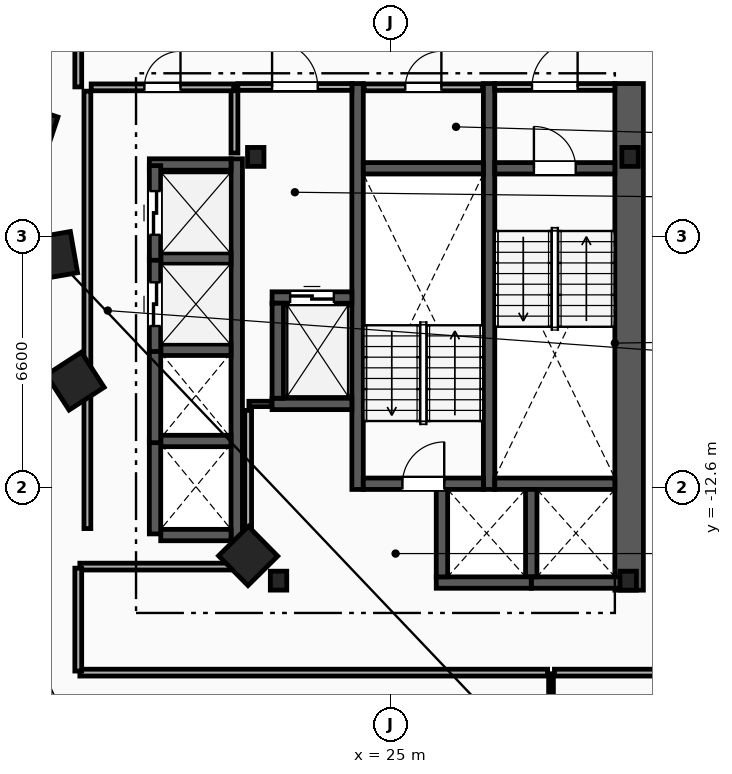
"""IFC4 building model, lengths in metres.
Left out: names, types, materials, properties, quantities, classifications, styles, units other than length and angle.
Written with IfcOpenShell. Run it as: python <this file> out.ifc"""

import sys

from ifc_helpers import new_model, si_unit, direction, frame, frame_2d, origin, origin_2d, place, context, subcontext, project, spatial, rectangle, i_section, extrude, element, fill, save


model = new_model("IFC4")
c1 = context("Model", 3, precision=1e-05, world=origin(), true_north=direction((0.0, 1.0)))
c2 = subcontext(c1, "Body", "Model", "MODEL_VIEW")
j1 = project(units=[si_unit("LENGTHUNIT", "METRE"), si_unit("PLANEANGLEUNIT", "RADIAN")], contexts=[c1])
p1 = place(None, origin())
s1 = spatial("IfcSite", under=j1, at=p1, CompositionType="ELEMENT")
p2 = place(p1, origin())
s2 = spatial("IfcBuilding", under=s1, at=p2, CompositionType="ELEMENT")
p3 = place(p2, frame((0.0, 0.0, 81.8)))
s3 = spatial("IfcBuildingStorey", under=s2, at=p3, CompositionType="ELEMENT", Elevation=81.8)
for number, where, z_axis, x_axis in (
    (1, (31.3, -3.9, 0.0), (0.0, 0.0, 1.0), (1.0, 0.0, 0.0)),
    (2, (21.45, -3.9, 0.0), (0.0, 0.0, 1.0), (1.0, 0.0, 0.0)),
    (3, (22.05, -15.05, 0.0), (0.0, 0.0, 1.0), (1.0, 0.0, 0.0)),
    (4, (31.25, -15.05, 0.0), (0.0, 0.0, 1.0), (1.0, 0.0, 0.0)),
):
    element("IfcColumn", number, at=place(p3, frame(where, z_axis=z_axis, x_axis=x_axis)), inside=s3, PredefinedType="COLUMN", context=c2, shape_type="SweptSolid", body=[
        extrude(i_section(OverallWidth=0.432, OverallDepth=0.498, WebThickness=0.056, FlangeThickness=0.089, FilletRadius=0.018, at=origin_2d()), origin(), (0.0, 0.0, 1.0), 3.6),
    ])
for number, where, z_axis, x_axis in (
    (5, (15.55, -3.2, 0.0), (0.0, 0.0, 1.0), (-0.315, -0.949, 0.0)),
    (6, (16.125, -6.5, 0.0), (0.0, 0.0, 1.0), (0.172, -0.985, 0.0)),
    (7, (16.7, -9.8, 0.0), (0.0, 0.0, 1.0), (0.544, -0.839, 0.0)),
    (8, (21.25, -14.4, 0.0), (0.0, 0.0, 1.0), (0.703, -0.711, 0.0)),
):
    element("IfcColumn", number, at=place(p3, frame(where, z_axis=z_axis, x_axis=x_axis)), inside=s3, PredefinedType="COLUMN", context=c2, shape_type="SweptSolid", body=[
        extrude(rectangle(XDim=1.1, YDim=1.1, at=origin_2d()), origin(), (0.0, 0.0, 1.0), 3.6),
    ])
p4 = place(p3, frame((31.275, -15.3, 0.0), z_axis=(0.0, 0.0, 1.0), x_axis=(0.0, 1.0, 0.0)))
e9 = element("IfcWall", 9, at=p4, inside=s3, PredefinedType="SHEAR", context=c2, shape_type="SweptSolid", body=[
    extrude(rectangle(XDim=13.33, YDim=0.75, at=frame_2d((6.665, 0.0))), origin(), (0.0, 0.0, 1.0), 3.3),
])
for number, where, z_axis, x_axis in (
    (10, (27.59, -12.65, 0.0), (0.0, 0.0, 1.0), (0.0, 1.0, 0.0)),
    (11, (24.13, -12.65, 0.0), (0.0, 0.0, 1.0), (0.0, 1.0, 0.0)),
):
    element("IfcWall", number, at=place(p3, frame(where, z_axis=z_axis, x_axis=x_axis)), inside=s3, PredefinedType="SHEAR", context=c2, shape_type="SweptSolid", body=[
        extrude(rectangle(XDim=10.68, YDim=0.3, at=frame_2d((5.34, 0.0))), origin(), (0.0, 0.0, 1.0), 3.3),
    ])
p5 = place(p3, frame((27.74, -4.2, 0.0), z_axis=(0.0, 0.0, 1.0), x_axis=(1.0, 0.0, 0.0)))
e12 = element("IfcWall", 12, at=p5, inside=s3, PredefinedType="SHEAR", context=c2, shape_type="SweptSolid", body=[
    extrude(rectangle(XDim=3.16, YDim=0.3, at=frame_2d((1.58, 0.0))), origin(), (0.0, 0.0, 1.0), 3.3),
])
p6 = place(p5, frame((1.03, 0.0, 0.0)))
e13 = element("IfcOpeningElement", 13, at=p6, cuts=e12, PredefinedType="OPENING", context=c2, shape_type="SweptSolid", body=[
    extrude(rectangle(XDim=1.1, YDim=2.15, at=frame_2d((0.55, 1.075))), frame((0.0, 0.16, 0.0), z_axis=(0.0, -1.0, 0.0), x_axis=(1.0, 0.0, 0.0)), (0.0, 0.0, 1.0), 0.32),
])
p7 = place(p3, frame((27.74, -12.5, 0.0), z_axis=(0.0, 0.0, 1.0), x_axis=(1.0, 0.0, 0.0)))
e14 = element("IfcWall", 14, at=p7, inside=s3, PredefinedType="SHEAR", context=c2, shape_type="SweptSolid", body=[
    extrude(rectangle(XDim=3.16, YDim=0.3, at=frame_2d((1.58, 0.0))), origin(), (0.0, 0.0, 1.0), 3.3),
])
p8 = place(p3, frame((24.28, -12.5, 0.0), z_axis=(0.0, 0.0, 1.0), x_axis=(1.0, 0.0, 0.0)))
e15 = element("IfcWall", 15, at=p8, inside=s3, PredefinedType="SHEAR", context=c2, shape_type="SweptSolid", body=[
    extrude(rectangle(XDim=3.16, YDim=0.3, at=frame_2d((1.58, 0.0))), origin(), (0.0, 0.0, 1.0), 3.3),
])
p9 = place(p8, frame((1.03, 0.0, 0.0)))
e16 = element("IfcOpeningElement", 16, at=p9, cuts=e15, PredefinedType="OPENING", context=c2, shape_type="SweptSolid", body=[
    extrude(rectangle(XDim=1.1, YDim=2.15, at=frame_2d((0.55, 1.075))), frame((0.0, 0.16, 0.0), z_axis=(0.0, -1.0, 0.0), x_axis=(1.0, 0.0, 0.0)), (0.0, 0.0, 1.0), 0.32),
])
p10 = place(p3, frame((24.28, -4.2, 0.0), z_axis=(0.0, 0.0, 1.0), x_axis=(1.0, 0.0, 0.0)))
e17 = element("IfcWall", 17, at=p10, inside=s3, PredefinedType="SHEAR", context=c2, shape_type="SweptSolid", body=[
    extrude(rectangle(XDim=3.16, YDim=0.3, at=frame_2d((1.58, 0.0))), origin(), (0.0, 0.0, 1.0), 3.3),
])
p11 = place(p3, frame((20.89, -3.8, 0.0), z_axis=(0.0, 0.0, 1.0), x_axis=(0.0, 1.0, 0.0)))
e18 = element("IfcWall", 18, at=p11, inside=s3, PredefinedType="PARTITIONING", context=c2, shape_type="SweptSolid", body=[
    extrude(rectangle(XDim=1.65, YDim=0.18, at=frame_2d((0.825, 0.0))), origin(), (0.0, 0.0, 1.0), 3.3),
])
p12 = place(p3, frame((20.98, -2.06, 0.0), z_axis=(0.0, 0.0, 1.0), x_axis=(1.0, 0.0, 0.0)))
e19 = element("IfcWall", 19, at=p12, inside=s3, PredefinedType="PARTITIONING", context=c2, shape_type="SweptSolid", body=[
    extrude(rectangle(XDim=3.0, YDim=0.18, at=frame_2d((1.5, 0.0))), origin(), (0.0, 0.0, 1.0), 3.3),
])
p13 = place(p12, frame((0.9, 0.0, 0.0)))
e20 = element("IfcOpeningElement", 20, at=p13, cuts=e19, PredefinedType="OPENING", context=c2, shape_type="SweptSolid", body=[
    extrude(rectangle(XDim=1.2, YDim=2.15, at=frame_2d((0.6, 1.075))), frame((0.0, 0.1, 0.0), z_axis=(0.0, -1.0, 0.0), x_axis=(1.0, 0.0, 0.0)), (0.0, 0.0, 1.0), 0.2),
])
p14 = place(p3, frame((27.74, -2.06, 0.0), z_axis=(0.0, 0.0, 1.0), x_axis=(1.0, 0.0, 0.0)))
e21 = element("IfcWall", 21, at=p14, inside=s3, PredefinedType="PARTITIONING", context=c2, shape_type="SweptSolid", body=[
    extrude(rectangle(XDim=3.16, YDim=0.18, at=frame_2d((1.58, 0.0))), origin(), (0.0, 0.0, 1.0), 3.3),
])
p15 = place(p14, frame((0.98, 0.0, 0.0)))
e22 = element("IfcOpeningElement", 22, at=p15, cuts=e21, PredefinedType="OPENING", context=c2, shape_type="SweptSolid", body=[
    extrude(rectangle(XDim=1.2, YDim=2.15, at=frame_2d((0.6, 1.075))), frame((0.0, 0.1, 0.0), z_axis=(0.0, -1.0, 0.0), x_axis=(1.0, 0.0, 0.0)), (0.0, 0.0, 1.0), 0.2),
])
p16 = place(p3, frame((21.88, -7.6, 0.0), z_axis=(0.0, 0.0, 1.0), x_axis=(1.0, 0.0, 0.0)))
e23 = element("IfcWall", 23, at=p16, inside=s3, PredefinedType="SHEAR", context=c2, shape_type="SweptSolid", body=[
    extrude(rectangle(XDim=2.1, YDim=0.3, at=frame_2d((1.05, 0.0))), origin(), (0.0, 0.0, 1.0), 3.3),
])
p17 = place(p16, frame((0.475, 0.0, 0.0)))
e24 = element("IfcOpeningElement", 24, at=p17, cuts=e23, PredefinedType="OPENING", context=c2, shape_type="SweptSolid", body=[
    extrude(rectangle(XDim=1.15, YDim=2.2, at=frame_2d((0.575, 1.1))), frame((0.0, 0.16, 0.0), z_axis=(0.0, -1.0, 0.0), x_axis=(1.0, 0.0, 0.0)), (0.0, 0.0, 1.0), 0.32),
])
p18 = place(p3, frame((21.88, -10.4, 0.0), z_axis=(0.0, 0.0, 1.0), x_axis=(1.0, 0.0, 0.0)))
e25 = element("IfcWall", 25, at=p18, inside=s3, PredefinedType="SHEAR", context=c2, shape_type="SweptSolid", body=[
    extrude(rectangle(XDim=2.1, YDim=0.3, at=frame_2d((1.05, 0.0))), origin(), (0.0, 0.0, 1.0), 3.3),
])
for number, where, z_axis, x_axis in (
    (26, (22.03, -10.25, 0.0), (0.0, 0.0, 1.0), (0.0, 1.0, 0.0)),
    (27, (28.7, -15.1, 0.0), (0.0, 0.0, 1.0), (1.0, 0.0, 0.0)),
):
    element("IfcWall", number, at=place(p3, frame(where, z_axis=z_axis, x_axis=x_axis)), inside=s3, PredefinedType="SHEAR", context=c2, shape_type="SweptSolid", body=[
        extrude(rectangle(XDim=2.5, YDim=0.3, at=frame_2d((1.25, 0.0))), origin(), (0.0, 0.0, 1.0), 3.3),
    ])
p19 = place(p3, frame((28.7, -14.95, 0.0), z_axis=(0.0, 0.0, 1.0), x_axis=(0.0, 1.0, 0.0)))
e28 = element("IfcWall", 28, at=p19, inside=s3, PredefinedType="SHEAR", context=c2, shape_type="SweptSolid", body=[
    extrude(rectangle(XDim=2.3, YDim=0.3, at=frame_2d((1.15, 0.0))), origin(), (0.0, 0.0, 1.0), 3.3),
])
p20 = place(p3, frame((26.2, -15.1, 0.0), z_axis=(0.0, 0.0, 1.0), x_axis=(1.0, 0.0, 0.0)))
e29 = element("IfcWall", 29, at=p20, inside=s3, PredefinedType="SHEAR", context=c2, shape_type="SweptSolid", body=[
    extrude(rectangle(XDim=2.5, YDim=0.3, at=frame_2d((1.25, 0.0))), origin(), (0.0, 0.0, 1.0), 3.3),
])
p21 = place(p3, frame((26.35, -14.95, 0.0), z_axis=(0.0, 0.0, 1.0), x_axis=(0.0, 1.0, 0.0)))
e30 = element("IfcWall", 30, at=p21, inside=s3, PredefinedType="SHEAR", context=c2, shape_type="SweptSolid", body=[
    extrude(rectangle(XDim=2.3, YDim=0.3, at=frame_2d((1.15, 0.0))), origin(), (0.0, 0.0, 1.0), 3.3),
])
p22 = place(p3, frame((20.95, -14.0, 0.0), z_axis=(0.0, 0.0, 1.0), x_axis=(0.0, 1.0, 0.0)))
e31 = element("IfcWall", 31, at=p22, inside=s3, PredefinedType="SHEAR", context=c2, shape_type="SweptSolid", body=[
    extrude(rectangle(XDim=10.05, YDim=0.3, at=frame_2d((5.025, 0.0))), origin(), (0.0, 0.0, 1.0), 3.3),
])
p23 = place(p3, frame((18.95, -13.85, 0.0), z_axis=(0.0, 0.0, 1.0), x_axis=(1.0, 0.0, 0.0)))
e32 = element("IfcWall", 32, at=p23, inside=s3, PredefinedType="SHEAR", context=c2, shape_type="SweptSolid", body=[
    extrude(rectangle(XDim=1.85, YDim=0.3, at=frame_2d((0.925, 0.0))), origin(), (0.0, 0.0, 1.0), 3.3),
])
p24 = place(p3, frame((18.65, -4.1, 0.0), z_axis=(0.0, 0.0, 1.0), x_axis=(1.0, 0.0, 0.0)))
e33 = element("IfcWall", 33, at=p24, inside=s3, PredefinedType="SHEAR", context=c2, shape_type="SweptSolid", body=[
    extrude(rectangle(XDim=2.15, YDim=0.3, at=frame_2d((1.075, 0.0))), origin(), (0.0, 0.0, 1.0), 3.3),
])
for number, where, z_axis, x_axis in (
    (34, (18.95, -11.375, 0.0), (0.0, 0.0, 1.0), (1.0, 0.0, 0.0)),
    (35, (18.95, -8.975, 0.0), (0.0, 0.0, 1.0), (1.0, 0.0, 0.0)),
    (36, (18.95, -6.575, 0.0), (0.0, 0.0, 1.0), (1.0, 0.0, 0.0)),
):
    element("IfcWall", number, at=place(p3, frame(where, z_axis=z_axis, x_axis=x_axis)), inside=s3, PredefinedType="SHEAR", context=c2, shape_type="SweptSolid", body=[
        extrude(rectangle(XDim=1.85, YDim=0.3, at=frame_2d((0.925, 0.0))), origin(), (0.0, 0.0, 1.0), 3.3),
    ])
for number, where, z_axis, x_axis in (
    (37, (18.8, -13.82, 0.0), (0.0, 0.0, 1.0), (0.0, 1.0, 0.0)),
    (38, (18.8, -11.42, 0.0), (0.0, 0.0, 1.0), (0.0, 1.0, 0.0)),
):
    element("IfcWall", number, at=place(p3, frame(where, z_axis=z_axis, x_axis=x_axis)), inside=s3, PredefinedType="SHEAR", context=c2, shape_type="SweptSolid", body=[
        extrude(rectangle(XDim=2.49, YDim=0.3, at=frame_2d((1.245, 0.0))), origin(), (0.0, 0.0, 1.0), 3.3),
    ])
p25 = place(p3, frame((18.8, -9.02, 0.0), z_axis=(0.0, 0.0, 1.0), x_axis=(0.0, 1.0, 0.0)))
e39 = element("IfcWall", 39, at=p25, inside=s3, PredefinedType="SHEAR", context=c2, shape_type="SweptSolid", body=[
    extrude(rectangle(XDim=2.49, YDim=0.3, at=frame_2d((1.245, 0.0))), origin(), (0.0, 0.0, 1.0), 3.3),
])
p26 = place(p25, frame((0.67, 0.0, 0.0)))
e40 = element("IfcOpeningElement", 40, at=p26, cuts=e39, PredefinedType="OPENING", context=c2, shape_type="SweptSolid", body=[
    extrude(rectangle(XDim=1.15, YDim=2.2, at=frame_2d((0.575, 1.1))), frame((0.0, 0.16, 0.0), z_axis=(0.0, -1.0, 0.0), x_axis=(1.0, 0.0, 0.0)), (0.0, 0.0, 1.0), 0.32),
])
p27 = place(p3, frame((18.8, -6.62, 0.0), z_axis=(0.0, 0.0, 1.0), x_axis=(0.0, 1.0, 0.0)))
e41 = element("IfcWall", 41, at=p27, inside=s3, PredefinedType="SHEAR", context=c2, shape_type="SweptSolid", body=[
    extrude(rectangle(XDim=2.49, YDim=0.3, at=frame_2d((1.245, 0.0))), origin(), (0.0, 0.0, 1.0), 3.3),
])
p28 = place(p27, frame((0.67, 0.0, 0.0)))
e42 = element("IfcOpeningElement", 42, at=p28, cuts=e41, PredefinedType="OPENING", context=c2, shape_type="SweptSolid", body=[
    extrude(rectangle(XDim=1.15, YDim=2.2, at=frame_2d((0.575, 1.1))), frame((0.0, 0.16, 0.0), z_axis=(0.0, -1.0, 0.0), x_axis=(1.0, 0.0, 0.0)), (0.0, 0.0, 1.0), 0.32),
])
p29 = place(p3, frame((17.02, -13.68, 0.0), z_axis=(0.0, 0.0, 1.0), x_axis=(0.0, 1.0, 0.0)))
e43 = element("IfcWall", 43, at=p29, inside=s3, PredefinedType="PARTITIONING", context=c2, shape_type="SweptSolid", body=[
    extrude(rectangle(XDim=11.51, YDim=0.18, at=frame_2d((5.755, 0.0))), origin(), (0.0, 0.0, 1.0), 3.3),
])
p30 = place(p3, frame((17.12, -2.07, 0.0), z_axis=(0.0, 0.0, 1.0), x_axis=(1.0, 0.0, 0.0)))
e44 = element("IfcWall", 44, at=p30, inside=s3, PredefinedType="PARTITIONING", context=c2, shape_type="SweptSolid", body=[
    extrude(rectangle(XDim=3.75, YDim=0.18, at=frame_2d((1.875, 0.0))), origin(), (0.0, 0.0, 1.0), 3.3),
])
p31 = place(p30, frame((1.4, 0.0, 0.0)))
e45 = element("IfcOpeningElement", 45, at=p31, cuts=e44, PredefinedType="OPENING", context=c2, shape_type="SweptSolid", body=[
    extrude(rectangle(XDim=0.95, YDim=2.1, at=frame_2d((0.475, 1.05))), frame((0.0, 0.1, 0.0), z_axis=(0.0, -1.0, 0.0), x_axis=(1.0, 0.0, 0.0)), (0.0, 0.0, 1.0), 0.2),
])
p32 = place(p3, frame((21.27, -10.4, 0.0), z_axis=(0.0, 0.0, 1.0), x_axis=(1.0, 0.0, 0.0)))
e46 = element("IfcWall", 46, at=p32, inside=s3, PredefinedType="PARTITIONING", context=c2, shape_type="SweptSolid", body=[
    extrude(rectangle(XDim=0.59, YDim=0.14, at=frame_2d((0.295, 0.0))), origin(), (0.0, 0.0, 1.0), 3.3),
])
p33 = place(p3, frame((21.25, -14.93, 0.0), z_axis=(0.0, 0.0, 1.0), x_axis=(0.0, 1.0, 0.0)))
e47 = element("IfcWall", 47, at=p33, inside=s3, PredefinedType="PARTITIONING", context=c2, shape_type="SweptSolid", body=[
    extrude(rectangle(XDim=4.36, YDim=0.18, at=frame_2d((2.18, 0.0))), origin(), (0.0, 0.0, 1.0), 3.3),
])
p34 = place(p3, frame((24.3, -2.07, 0.0), z_axis=(0.0, 0.0, 1.0), x_axis=(1.0, 0.0, 0.0)))
e48 = element("IfcWall", 48, at=p34, inside=s3, PredefinedType="PARTITIONING", context=c2, shape_type="SweptSolid", body=[
    extrude(rectangle(XDim=3.12, YDim=0.18, at=frame_2d((1.56, 0.0))), origin(), (0.0, 0.0, 1.0), 3.3),
])
p35 = place(p34, frame((1.085, 0.0, 0.0)))
e49 = element("IfcOpeningElement", 49, at=p35, cuts=e48, PredefinedType="OPENING", context=c2, shape_type="SweptSolid", body=[
    extrude(rectangle(XDim=0.95, YDim=2.1, at=frame_2d((0.475, 1.05))), frame((0.0, 0.1, 0.0), z_axis=(0.0, -1.0, 0.0), x_axis=(1.0, 0.0, 0.0)), (0.0, 0.0, 1.0), 0.2),
])
p36 = place(p3, frame((29.22, -25.966, 0.0), z_axis=(0.0, 0.0, 1.0), x_axis=(0.0, 1.0, 0.0)))
e50 = element("IfcWall", 50, at=p36, inside=s3, PredefinedType="PARTITIONING", context=c2, shape_type="SweptSolid", body=[
    extrude(rectangle(XDim=8.466, YDim=0.125, at=frame_2d((4.233, 0.0))), origin(), (0.0, 0.0, 1.0), 3.3),
])
p37 = place(p3, frame((29.31, -17.47, 0.0), z_axis=(0.0, 0.0, 1.0), x_axis=(1.0, 0.0, 0.0)))
e51 = element("IfcWall", 51, at=p37, inside=s3, PredefinedType="PARTITIONING", context=c2, shape_type="SweptSolid", body=[
    extrude(rectangle(XDim=4.318, YDim=0.18, at=frame_2d((2.159, 0.0))), origin(), (0.0, 0.0, 1.0), 3.3),
])
p38 = place(p3, frame((16.822, -17.47, 0.0), z_axis=(0.0, 0.0, 1.0), x_axis=(1.0, 0.0, 0.0)))
e52 = element("IfcWall", 52, at=p38, inside=s3, PredefinedType="PARTITIONING", context=c2, shape_type="SweptSolid", body=[
    extrude(rectangle(XDim=12.308, YDim=0.18, at=frame_2d((6.154, 0.0))), origin(), (0.0, 0.0, 1.0), 3.3),
])
p39 = place(p3, frame((21.178, -14.68, 0.0), z_axis=(0.0, 0.0, 1.0), x_axis=(-1.0, 0.0, 0.0)))
e53 = element("IfcWall", 53, at=p39, inside=s3, PredefinedType="PARTITIONING", context=c2, shape_type="SweptSolid", body=[
    extrude(rectangle(XDim=4.357, YDim=0.18, at=frame_2d((2.178, 0.0))), origin(), (0.0, 0.0, 1.0), 3.3),
])
p40 = place(p3, frame((16.78, -14.721, 0.0), z_axis=(0.0, 0.0, 1.0), x_axis=(0.0, -1.0, 0.0)))
e54 = element("IfcWall", 54, at=p40, inside=s3, PredefinedType="PARTITIONING", context=c2, shape_type="SweptSolid", body=[
    extrude(rectangle(XDim=2.707, YDim=0.18, at=frame_2d((1.354, 0.0))), origin(), (0.0, 0.0, 1.0), 3.3),
])
p41 = place(p3, frame((16.78, 0.329, 0.0), z_axis=(0.0, 0.0, 1.0), x_axis=(0.0, -1.0, 0.0)))
e55 = element("IfcWall", 55, at=p41, inside=s3, PredefinedType="PARTITIONING", context=c2, shape_type="SweptSolid", body=[
    extrude(rectangle(XDim=2.387, YDim=0.18, at=frame_2d((1.194, 0.0))), origin(), (0.0, 0.0, 1.0), 3.3),
])
p42 = place(p6, origin())
e56 = element("IfcDoor", 56, at=p42, inside=s3, OperationType="SINGLE_SWING_LEFT", PredefinedType="DOOR", context=c2, shape_type="SweptSolid", body=[
    extrude(rectangle(XDim=1.1, YDim=2.15, at=frame_2d((0.55, 1.075))), frame((0.0, 0.025, 0.0), z_axis=(0.0, -1.0, 0.0), x_axis=(1.0, 0.0, 0.0)), (0.0, 0.0, 1.0), 0.05),
])
fill(e13, e56)
p43 = place(p9, origin())
e57 = element("IfcDoor", 57, at=p43, inside=s3, OperationType="SINGLE_SWING_RIGHT", PredefinedType="DOOR", context=c2, shape_type="SweptSolid", body=[
    extrude(rectangle(XDim=1.1, YDim=2.15, at=frame_2d((0.55, 1.075))), frame((0.0, 0.025, 0.0), z_axis=(0.0, -1.0, 0.0), x_axis=(1.0, 0.0, 0.0)), (0.0, 0.0, 1.0), 0.05),
])
fill(e16, e57)
p44 = place(p13, origin())
e58 = element("IfcDoor", 58, at=p44, inside=s3, OperationType="SINGLE_SWING_LEFT", PredefinedType="DOOR", context=c2, shape_type="SweptSolid", body=[
    extrude(rectangle(XDim=1.2, YDim=2.15, at=frame_2d((0.6, 1.075))), frame((0.0, 0.025, 0.0), z_axis=(0.0, -1.0, 0.0), x_axis=(1.0, 0.0, 0.0)), (0.0, 0.0, 1.0), 0.05),
])
fill(e20, e58)
p45 = place(p15, origin())
e59 = element("IfcDoor", 59, at=p45, inside=s3, OperationType="SINGLE_SWING_RIGHT", PredefinedType="DOOR", context=c2, shape_type="SweptSolid", body=[
    extrude(rectangle(XDim=1.2, YDim=2.15, at=frame_2d((0.6, 1.075))), frame((0.0, 0.025, 0.0), z_axis=(0.0, -1.0, 0.0), x_axis=(1.0, 0.0, 0.0)), (0.0, 0.0, 1.0), 0.05),
])
fill(e22, e59)
p46 = place(p17, origin())
e60 = element("IfcDoor", 60, at=p46, inside=s3, OperationType="SLIDING_TO_LEFT", PredefinedType="TRAPDOOR", context=c2, shape_type="SweptSolid", body=[
    extrude(rectangle(XDim=1.15, YDim=2.2, at=frame_2d((0.575, 1.1))), frame((0.0, 0.025, 0.0), z_axis=(0.0, -1.0, 0.0), x_axis=(1.0, 0.0, 0.0)), (0.0, 0.0, 1.0), 0.05),
])
fill(e24, e60)
p47 = place(p26, origin())
e61 = element("IfcDoor", 61, at=p47, inside=s3, OperationType="SLIDING_TO_LEFT", PredefinedType="TRAPDOOR", context=c2, shape_type="SweptSolid", body=[
    extrude(rectangle(XDim=1.15, YDim=2.2, at=frame_2d((0.575, 1.1))), frame((0.0, 0.025, 0.0), z_axis=(0.0, -1.0, 0.0), x_axis=(1.0, 0.0, 0.0)), (0.0, 0.0, 1.0), 0.05),
])
fill(e40, e61)
p48 = place(p28, origin())
e62 = element("IfcDoor", 62, at=p48, inside=s3, OperationType="SLIDING_TO_LEFT", PredefinedType="TRAPDOOR", context=c2, shape_type="SweptSolid", body=[
    extrude(rectangle(XDim=1.15, YDim=2.2, at=frame_2d((0.575, 1.1))), frame((0.0, 0.025, 0.0), z_axis=(0.0, -1.0, 0.0), x_axis=(1.0, 0.0, 0.0)), (0.0, 0.0, 1.0), 0.05),
])
fill(e42, e62)
p49 = place(p31, origin())
e63 = element("IfcDoor", 63, at=p49, inside=s3, OperationType="SINGLE_SWING_RIGHT", PredefinedType="DOOR", context=c2, shape_type="SweptSolid", body=[
    extrude(rectangle(XDim=0.95, YDim=2.1, at=frame_2d((0.475, 1.05))), frame((0.0, 0.025, 0.0), z_axis=(0.0, -1.0, 0.0), x_axis=(1.0, 0.0, 0.0)), (0.0, 0.0, 1.0), 0.05),
])
fill(e45, e63)
p50 = place(p35, origin())
e64 = element("IfcDoor", 64, at=p50, inside=s3, OperationType="SINGLE_SWING_RIGHT", PredefinedType="DOOR", context=c2, shape_type="SweptSolid", body=[
    extrude(rectangle(XDim=0.95, YDim=2.1, at=frame_2d((0.475, 1.05))), frame((0.0, 0.025, 0.0), z_axis=(0.0, -1.0, 0.0), x_axis=(1.0, 0.0, 0.0)), (0.0, 0.0, 1.0), 0.05),
])
fill(e49, e64)
save(model, sys.argv[1])
